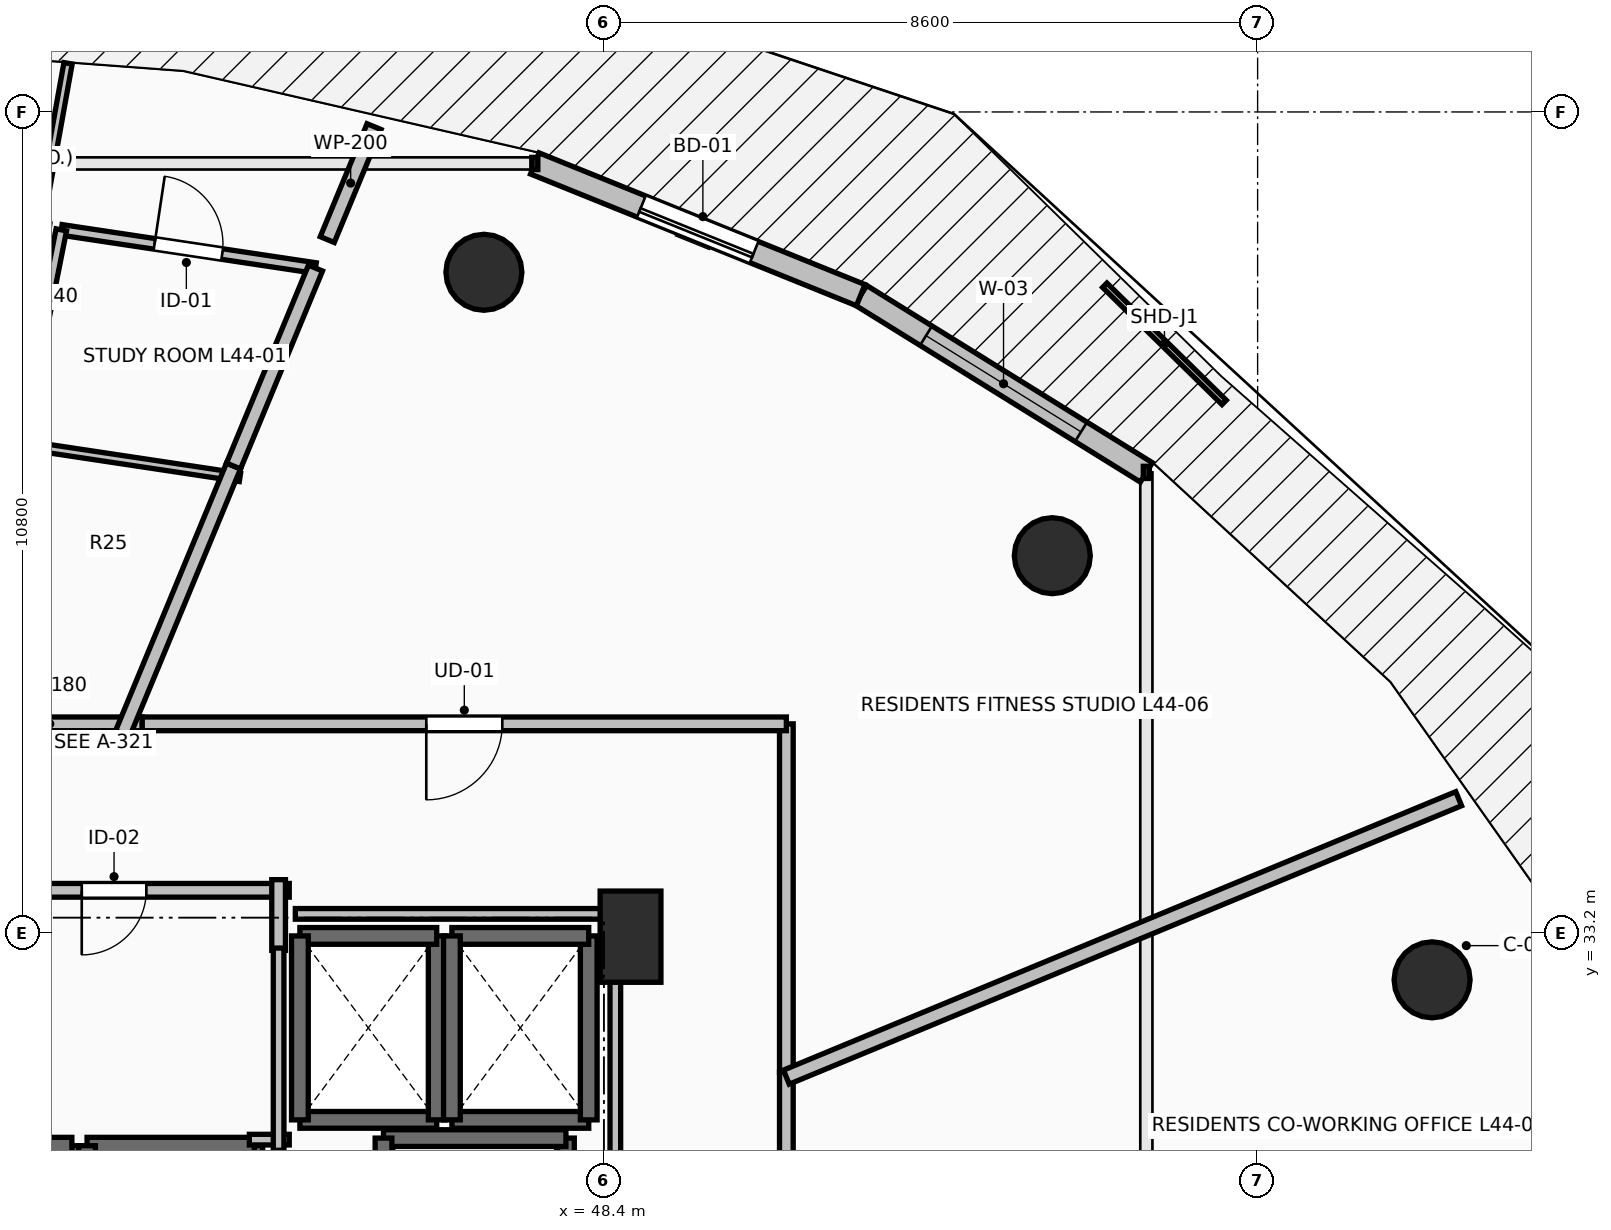
"""IFC4 building model, lengths in metres.
Left out: names, types, materials, properties, quantities, classifications, styles, units other than length and angle.
Written with IfcOpenShell. Run it as: python <this file> out.ifc"""

import sys

from ifc_helpers import new_model, si_unit, direction, frame, frame_2d, origin, origin_2d, place, context, subcontext, project, spatial, rectangle, circle, extrude, element, fill, save


model = new_model("IFC4")
c1 = context("Model", 3, precision=1e-05, world=origin(), true_north=direction((0.0, 1.0)))
c2 = subcontext(c1, "Body", "Model", "MODEL_VIEW")
j1 = project(units=[si_unit("LENGTHUNIT", "METRE"), si_unit("PLANEANGLEUNIT", "RADIAN")], contexts=[c1])
p1 = place(None, origin())
s1 = spatial("IfcSite", under=j1, at=p1, CompositionType="ELEMENT")
p2 = place(p1, origin())
s2 = spatial("IfcBuilding", under=s1, at=p2, CompositionType="ELEMENT")
p3 = place(p2, frame((0.0, 0.0, 164.1)))
s3 = spatial("IfcBuildingStorey", under=s2, at=p3, CompositionType="ELEMENT", Elevation=164.1)
for number, where, z_axis, x_axis in (
    (1, (59.295, 32.582, 0.0), (0.0, 0.0, 1.0), (0.924, 0.383, 0.0)),
    (2, (54.299, 38.162, 0.0), (0.0, 0.0, 1.0), (0.707, 0.707, 0.0)),
    (3, (46.821, 41.891, 0.0), (0.0, 0.0, 1.0), (0.383, 0.924, 0.0)),
):
    element("IfcColumn", number, at=place(p3, frame(where, z_axis=z_axis, x_axis=x_axis)), inside=s3, PredefinedType="COLUMN", context=c2, shape_type="SweptSolid", body=[
        extrude(circle(Radius=0.5, at=origin_2d()), origin(), (0.0, 0.0, 1.0), 3.5),
    ])
p4 = place(p3, frame((48.75, 33.15, 0.0), z_axis=(0.0, 0.0, 1.0), x_axis=(1.0, 0.0, 0.0)))
e4 = element("IfcColumn", 4, at=p4, inside=s3, PredefinedType="PILASTER", context=c2, shape_type="SweptSolid", body=[
    extrude(rectangle(XDim=0.8, YDim=1.2, at=origin_2d()), origin(), (0.0, 0.0, 1.0), 3.5),
])
p5 = place(p3, frame((55.536, 39.258, 0.0), z_axis=(0.0, 0.0, 1.0), x_axis=(-0.849721181976, 0.527232313977, 0.0)))
e5 = element("IfcWall", 5, at=p5, inside=s3, PredefinedType="STANDARD", context=c2, shape_type="SweptSolid", body=[
    extrude(rectangle(XDim=4.423, YDim=0.3, at=frame_2d((2.211, 0.0))), origin(), (0.0, 0.0, 1.0), 3.24),
])
p6 = place(p5, frame((1.011, 0.0, 0.85)))
e6 = element("IfcOpeningElement", 6, at=p6, cuts=e5, PredefinedType="OPENING", context=c2, shape_type="SweptSolid", body=[
    extrude(rectangle(XDim=2.4, YDim=2.19, at=frame_2d((1.2, 1.095))), frame((0.0, 0.165, 0.0), z_axis=(0.0, -1.0, 0.0), x_axis=(1.0, 0.0, 0.0)), (0.0, 0.0, 1.0), 0.33),
])
p7 = place(p3, frame((51.778, 41.59, 0.0), z_axis=(0.0, 0.0, 1.0), x_axis=(-0.927156504392, 0.374674280359, 0.0)))
e7 = element("IfcWall", 7, at=p7, inside=s3, PredefinedType="STANDARD", context=c2, shape_type="SweptSolid", body=[
    extrude(rectangle(XDim=4.625, YDim=0.3, at=frame_2d((2.312, 0.0))), origin(), (0.0, 0.0, 1.0), 3.24),
])
p8 = place(p7, frame((1.512, 0.0, 0.0)))
e8 = element("IfcOpeningElement", 8, at=p8, cuts=e7, PredefinedType="OPENING", context=c2, shape_type="SweptSolid", body=[
    extrude(rectangle(XDim=1.6, YDim=2.3, at=frame_2d((0.8, 1.15))), frame((0.0, 0.165, 0.0), z_axis=(0.0, -1.0, 0.0), x_axis=(1.0, 0.0, 0.0)), (0.0, 0.0, 1.0), 0.33),
])
p9 = place(p3, frame((41.4, 27.8, 0.0), z_axis=(0.0, 0.0, 1.0), x_axis=(0.0, 1.0, 0.0)))
e9 = element("IfcWall", 9, at=p9, inside=s3, PredefinedType="SOLIDWALL", context=c2, shape_type="SweptSolid", body=[
    extrude(rectangle(XDim=2.6, YDim=0.22, at=frame_2d((1.3, 0.0))), origin(), (0.0, 0.0, 1.0), 3.24),
])
p10 = place(p3, frame((41.4, 30.4, 0.0), z_axis=(0.0, 0.0, 1.0), x_axis=(-1.0, 0.0, 0.0)))
e10 = element("IfcWall", 10, at=p10, inside=s3, PredefinedType="SOLIDWALL", context=c2, shape_type="SweptSolid", body=[
    extrude(rectangle(XDim=2.2, YDim=0.22, at=frame_2d((1.1, 0.0))), origin(), (0.0, 0.0, 1.0), 3.24),
])
p11 = place(p3, frame((43.8, 27.8, 0.0), z_axis=(0.0, 0.0, 1.0), x_axis=(0.0, 1.0, 0.0)))
e11 = element("IfcWall", 11, at=p11, inside=s3, PredefinedType="SOLIDWALL", context=c2, shape_type="SweptSolid", body=[
    extrude(rectangle(XDim=2.6, YDim=0.22, at=frame_2d((1.3, 0.0))), origin(), (0.0, 0.0, 1.0), 3.24),
])
p12 = place(p3, frame((43.8, 30.4, 0.0), z_axis=(0.0, 0.0, 1.0), x_axis=(-1.0, 0.0, 0.0)))
e12 = element("IfcWall", 12, at=p12, inside=s3, PredefinedType="SOLIDWALL", context=c2, shape_type="SweptSolid", body=[
    extrude(rectangle(XDim=2.2, YDim=0.22, at=frame_2d((1.1, 0.0))), origin(), (0.0, 0.0, 1.0), 3.24),
])
p13 = place(p3, frame((41.6, 30.4, 0.0), z_axis=(0.0, 0.0, 1.0), x_axis=(0.0, -1.0, 0.0)))
e13 = element("IfcWall", 13, at=p13, inside=s3, PredefinedType="SOLIDWALL", context=c2, shape_type="SweptSolid", body=[
    extrude(rectangle(XDim=2.6, YDim=0.22, at=frame_2d((1.3, 0.0))), origin(), (0.0, 0.0, 1.0), 3.24),
])
p14 = place(p3, frame((44.4, 30.74, 0.0), z_axis=(0.0, 0.0, 1.0), x_axis=(1.0, 0.0, 0.0)))
e14 = element("IfcWall", 14, at=p14, inside=s3, PredefinedType="SOLIDWALL", context=c2, shape_type="SweptSolid", body=[
    extrude(rectangle(XDim=1.8, YDim=0.22, at=frame_2d((0.9, 0.0))), origin(), (0.0, 0.0, 1.0), 3.24),
])
p15 = place(p3, frame((46.2, 30.74, 0.0), z_axis=(0.0, 0.0, 1.0), x_axis=(0.0, 1.0, 0.0)))
e15 = element("IfcWall", 15, at=p15, inside=s3, PredefinedType="SOLIDWALL", context=c2, shape_type="SweptSolid", body=[
    extrude(rectangle(XDim=2.42, YDim=0.22, at=frame_2d((1.21, 0.0))), origin(), (0.0, 0.0, 1.0), 3.24),
])
p16 = place(p3, frame((46.2, 33.16, 0.0), z_axis=(0.0, 0.0, 1.0), x_axis=(-1.0, 0.0, 0.0)))
e16 = element("IfcWall", 16, at=p16, inside=s3, PredefinedType="SOLIDWALL", context=c2, shape_type="SweptSolid", body=[
    extrude(rectangle(XDim=1.8, YDim=0.22, at=frame_2d((0.9, 0.0))), origin(), (0.0, 0.0, 1.0), 3.24),
])
p17 = place(p3, frame((44.4, 33.16, 0.0), z_axis=(0.0, 0.0, 1.0), x_axis=(0.0, -1.0, 0.0)))
e17 = element("IfcWall", 17, at=p17, inside=s3, PredefinedType="SOLIDWALL", context=c2, shape_type="SweptSolid", body=[
    extrude(rectangle(XDim=2.42, YDim=0.22, at=frame_2d((1.21, 0.0))), origin(), (0.0, 0.0, 1.0), 3.24),
])
p18 = place(p3, frame((46.4, 30.74, 0.0), z_axis=(0.0, 0.0, 1.0), x_axis=(1.0, 0.0, 0.0)))
e18 = element("IfcWall", 18, at=p18, inside=s3, PredefinedType="SOLIDWALL", context=c2, shape_type="SweptSolid", body=[
    extrude(rectangle(XDim=1.8, YDim=0.22, at=frame_2d((0.9, 0.0))), origin(), (0.0, 0.0, 1.0), 3.24),
])
p19 = place(p3, frame((48.2, 30.74, 0.0), z_axis=(0.0, 0.0, 1.0), x_axis=(0.0, 1.0, 0.0)))
e19 = element("IfcWall", 19, at=p19, inside=s3, PredefinedType="SOLIDWALL", context=c2, shape_type="SweptSolid", body=[
    extrude(rectangle(XDim=2.42, YDim=0.22, at=frame_2d((1.21, 0.0))), origin(), (0.0, 0.0, 1.0), 3.24),
])
p20 = place(p3, frame((48.2, 33.16, 0.0), z_axis=(0.0, 0.0, 1.0), x_axis=(-1.0, 0.0, 0.0)))
e20 = element("IfcWall", 20, at=p20, inside=s3, PredefinedType="SOLIDWALL", context=c2, shape_type="SweptSolid", body=[
    extrude(rectangle(XDim=1.8, YDim=0.22, at=frame_2d((0.9, 0.0))), origin(), (0.0, 0.0, 1.0), 3.24),
])
p21 = place(p3, frame((46.4, 33.16, 0.0), z_axis=(0.0, 0.0, 1.0), x_axis=(0.0, -1.0, 0.0)))
e21 = element("IfcWall", 21, at=p21, inside=s3, PredefinedType="SOLIDWALL", context=c2, shape_type="SweptSolid", body=[
    extrude(rectangle(XDim=2.42, YDim=0.22, at=frame_2d((1.21, 0.0))), origin(), (0.0, 0.0, 1.0), 3.24),
])
p22 = place(p3, frame((47.9, 28.0, 0.0), z_axis=(0.0, 0.0, 1.0), x_axis=(0.0, 1.0, 0.0)))
e22 = element("IfcWall", 22, at=p22, inside=s3, PredefinedType="SHEAR", context=c2, shape_type="SweptSolid", body=[
    extrude(rectangle(XDim=2.5, YDim=0.22, at=frame_2d((1.25, 0.0))), origin(), (0.0, 0.0, 1.0), 3.24),
])
p23 = place(p3, frame((47.9, 30.5, 0.0), z_axis=(0.0, 0.0, 1.0), x_axis=(-1.0, 0.0, 0.0)))
e23 = element("IfcWall", 23, at=p23, inside=s3, PredefinedType="SHEAR", context=c2, shape_type="SweptSolid", body=[
    extrude(rectangle(XDim=2.4, YDim=0.22, at=frame_2d((1.2, 0.0))), origin(), (0.0, 0.0, 1.0), 3.24),
])
p24 = place(p3, frame((45.5, 30.5, 0.0), z_axis=(0.0, 0.0, 1.0), x_axis=(0.0, -1.0, 0.0)))
e24 = element("IfcWall", 24, at=p24, inside=s3, PredefinedType="SHEAR", context=c2, shape_type="SweptSolid", body=[
    extrude(rectangle(XDim=2.5, YDim=0.22, at=frame_2d((1.25, 0.0))), origin(), (0.0, 0.0, 1.0), 3.24),
])
p25 = place(p3, frame((44.26, 33.76, 0.0), z_axis=(0.0, 0.0, 1.0), x_axis=(-1.0, 0.0, 0.0)))
e25 = element("IfcWall", 25, at=p25, inside=s3, PredefinedType="PARTITIONING", context=c2, shape_type="SweptSolid", body=[
    extrude(rectangle(XDim=4.61, YDim=0.18, at=frame_2d((2.305, 0.0))), origin(), (0.0, 0.0, 1.0), 3.24),
])
p26 = place(p25, frame((1.88, 0.0, 0.0)))
e26 = element("IfcOpeningElement", 26, at=p26, cuts=e25, PredefinedType="OPENING", context=c2, shape_type="SweptSolid", body=[
    extrude(rectangle(XDim=0.85, YDim=2.1, at=frame_2d((0.425, 1.05))), frame((0.0, 0.105, 0.0), z_axis=(0.0, -1.0, 0.0), x_axis=(1.0, 0.0, 0.0)), (0.0, 0.0, 1.0), 0.21),
])
p27 = place(p3, frame((44.12, 32.97, 0.0), z_axis=(0.0, 0.0, 1.0), x_axis=(0.0, 1.0, 0.0)))
e27 = element("IfcWall", 27, at=p27, inside=s3, PredefinedType="PARTITIONING", context=c2, shape_type="SweptSolid", body=[
    extrude(rectangle(XDim=0.93, YDim=0.18, at=frame_2d((0.465, 0.0))), origin(), (0.0, 0.0, 1.0), 3.24),
])
p28 = place(p3, frame((42.326, 35.95, 0.0), z_axis=(0.0, 0.0, 1.0), x_axis=(-1.0, 0.0, 0.0)))
e28 = element("IfcWall", 28, at=p28, inside=s3, PredefinedType="PARTITIONING", context=c2, shape_type="SweptSolid", body=[
    extrude(rectangle(XDim=2.432, YDim=0.18, at=frame_2d((1.216, 0.0))), origin(), (0.0, 0.0, 1.0), 3.24),
])
p29 = place(p3, frame((50.8, 27.25, 0.0), z_axis=(0.0, 0.0, 1.0), x_axis=(0.0, 1.0, 0.0)))
e29 = element("IfcWall", 29, at=p29, inside=s3, PredefinedType="PARTITIONING", context=c2, shape_type="SweptSolid", body=[
    extrude(rectangle(XDim=4.117, YDim=0.18, at=frame_2d((2.059, 0.0))), origin(), (0.0, 0.0, 1.0), 2.432),
])
p30 = place(p3, frame((50.8, 31.367, 0.0), z_axis=(0.0, 0.0, 1.0), x_axis=(0.0, 1.0, 0.0)))
e30 = element("IfcWall", 30, at=p30, inside=s3, PredefinedType="PARTITIONING", context=c2, shape_type="SweptSolid", body=[
    extrude(rectangle(XDim=4.583, YDim=0.18, at=frame_2d((2.292, 0.0))), origin(), (0.0, 0.0, 1.0), 2.432),
])
p31 = place(p3, frame((50.8, 35.95, 0.0), z_axis=(0.0, 0.0, 1.0), x_axis=(-1.0, 0.0, 0.0)))
e31 = element("IfcWall", 31, at=p31, inside=s3, PredefinedType="PARTITIONING", context=c2, shape_type="SweptSolid", body=[
    extrude(rectangle(XDim=8.474, YDim=0.18, at=frame_2d((4.237, 0.0))), origin(), (0.0, 0.0, 1.0), 2.432),
])
p32 = place(p31, frame((3.737, 0.0, 0.0)))
e32 = element("IfcOpeningElement", 32, at=p32, cuts=e31, PredefinedType="OPENING", context=c2, shape_type="SweptSolid", body=[
    extrude(rectangle(XDim=1.0, YDim=2.15, at=frame_2d((0.5, 1.075))), frame((0.0, 0.105, 0.0), z_axis=(0.0, -1.0, 0.0), x_axis=(1.0, 0.0, 0.0)), (0.0, 0.0, 1.0), 0.21),
])
p33 = place(p3, frame((41.35, 44.64, 0.0), z_axis=(0.0, 0.0, 1.0), x_axis=(-0.176977699102, -0.984214861715, 0.0)))
e33 = element("IfcWall", 33, at=p33, inside=s3, PredefinedType="PARTITIONING", context=c2, shape_type="SweptSolid", body=[
    extrude(rectangle(XDim=2.32, YDim=0.11, at=frame_2d((1.16, 0.0))), origin(), (0.0, 0.0, 1.0), 2.728),
])
p34 = place(p3, frame((41.261, 42.449, 0.0), z_axis=(0.0, 0.0, 1.0), x_axis=(0.988878555922, -0.148725255545, 0.0)))
e34 = element("IfcWall", 34, at=p34, inside=s3, PredefinedType="PARTITIONING", context=c2, shape_type="SweptSolid", body=[
    extrude(rectangle(XDim=3.382, YDim=0.14, at=frame_2d((1.691, 0.0))), origin(), (0.0, 0.0, 1.0), 3.24),
])
p35 = place(p34, frame((1.241, 0.0, 0.0)))
e35 = element("IfcOpeningElement", 35, at=p35, cuts=e34, PredefinedType="OPENING", context=c2, shape_type="SweptSolid", body=[
    extrude(rectangle(XDim=0.9, YDim=2.1, at=frame_2d((0.45, 1.05))), frame((0.0, 0.085, 0.0), z_axis=(0.0, -1.0, 0.0), x_axis=(1.0, 0.0, 0.0)), (0.0, 0.0, 1.0), 0.17),
])
p36 = place(p3, frame((40.729, 39.767, 0.0), z_axis=(0.0, 0.0, 1.0), x_axis=(0.194501549107, 0.980902210924, 0.0)))
e36 = element("IfcWall", 36, at=p36, inside=s3, PredefinedType="PARTITIONING", context=c2, shape_type="SweptSolid", body=[
    extrude(rectangle(XDim=2.734, YDim=0.14, at=frame_2d((1.367, 0.0))), origin(), (0.0, 0.0, 1.0), 2.886),
])
p37 = place(p3, frame((44.76, 42.321, 0.0), z_axis=(0.0, 0.0, 1.0), x_axis=(0.382955001099, 0.923766998292, 0.0)))
e37 = element("IfcWall", 37, at=p37, inside=s3, PredefinedType="PARTITIONING", context=c2, shape_type="SweptSolid", body=[
    extrude(rectangle(XDim=1.608, YDim=0.2, at=frame_2d((0.804, 0.0))), origin(), (0.0, 0.0, 1.0), 2.728),
])
p38 = place(p3, frame((43.611, 39.192, 0.0), z_axis=(0.0, 0.0, 1.0), x_axis=(-0.988860105068, 0.148847884116, 0.0)))
e38 = element("IfcWall", 38, at=p38, inside=s3, PredefinedType="PARTITIONING", context=c2, shape_type="SweptSolid", body=[
    extrude(rectangle(XDim=3.082, YDim=0.11, at=frame_2d((1.541, 0.0))), origin(), (0.0, 0.0, 1.0), 2.886),
])
p39 = place(p3, frame((42.067, 35.821, 0.0), z_axis=(0.0, 0.0, 1.0), x_axis=(0.382813734438, 0.92382554886, 0.0)))
e39 = element("IfcWall", 39, at=p39, inside=s3, PredefinedType="PARTITIONING", context=c2, shape_type="SweptSolid", body=[
    extrude(rectangle(XDim=3.812, YDim=0.2, at=frame_2d((1.906, 0.0))), origin(), (0.0, 0.0, 1.0), 2.886),
])
p40 = place(p3, frame((43.527, 39.342, 0.0), z_axis=(0.0, 0.0, 1.0), x_axis=(0.38263998022, 0.923897529782, 0.0)))
e40 = element("IfcWall", 40, at=p40, inside=s3, PredefinedType="PARTITIONING", context=c2, shape_type="SweptSolid", body=[
    extrude(rectangle(XDim=2.818, YDim=0.2, at=frame_2d((1.409, 0.0))), origin(), (0.0, 0.0, 1.0), 2.886),
])
p41 = place(p3, frame((59.645, 34.965, 0.0), z_axis=(0.0, 0.0, 1.0), x_axis=(-0.923902460479, -0.382628074665, 0.0)))
e41 = element("IfcWall", 41, at=p41, inside=s3, PredefinedType="PARTITIONING", context=c2, shape_type="SweptSolid", body=[
    extrude(rectangle(XDim=9.573, YDim=0.2, at=frame_2d((4.787, 0.0))), origin(), (0.0, 0.0, 1.0), 2.432),
])
p42 = place(p3, frame((43.735, 30.48, 0.0), z_axis=(0.0, 0.0, 1.0), x_axis=(1.0, 0.0, 0.0)))
e42 = element("IfcWall", 42, at=p42, inside=s3, PredefinedType="PARTITIONING", context=c2, shape_type="SweptSolid", body=[
    extrude(rectangle(XDim=0.525, YDim=0.14, at=frame_2d((0.262, 0.0))), origin(), (0.0, 0.0, 1.0), 3.24),
])
p43 = place(p3, frame((44.12, 30.34, 0.0), z_axis=(0.0, 0.0, 1.0), x_axis=(0.0, 1.0, 0.0)))
e43 = element("IfcWall", 43, at=p43, inside=s3, PredefinedType="PARTITIONING", context=c2, shape_type="SweptSolid", body=[
    extrude(rectangle(XDim=2.66, YDim=0.14, at=frame_2d((1.33, 0.0))), origin(), (0.0, 0.0, 1.0), 3.24),
])
p44 = place(p3, frame((48.55, 28.196, 0.0), z_axis=(0.0, 0.0, 1.0), x_axis=(0.0, 1.0, 0.0)))
e44 = element("IfcWall", 44, at=p44, inside=s3, PredefinedType="PARTITIONING", context=c2, shape_type="SweptSolid", body=[
    extrude(rectangle(XDim=5.254, YDim=0.14, at=frame_2d((2.627, 0.0))), origin(), (0.0, 0.0, 1.0), 2.432),
])
p45 = place(p3, frame((48.55, 33.45, 0.0), z_axis=(0.0, 0.0, 1.0), x_axis=(-1.0, 0.0, 0.0)))
e45 = element("IfcWall", 45, at=p45, inside=s3, PredefinedType="PARTITIONING", context=c2, shape_type="SweptSolid", body=[
    extrude(rectangle(XDim=4.21, YDim=0.14, at=frame_2d((2.105, 0.0))), origin(), (0.0, 0.0, 1.0), 2.432),
])
p46 = place(p8, origin())
e46 = element("IfcDoor", 46, at=p46, inside=s3, OperationType="SLIDING_TO_LEFT", PredefinedType="DOOR", context=c2, shape_type="SweptSolid", body=[
    extrude(rectangle(XDim=1.6, YDim=2.3, at=frame_2d((0.8, 1.15))), frame((0.0, 0.025, 0.0), z_axis=(0.0, -1.0, 0.0), x_axis=(1.0, 0.0, 0.0)), (0.0, 0.0, 1.0), 0.05),
])
fill(e8, e46)
p47 = place(p6, origin())
e47 = element("IfcWindow", 47, at=p47, inside=s3, PartitioningType="SINGLE_PANEL", PredefinedType="WINDOW", context=c2, shape_type="SweptSolid", body=[
    extrude(rectangle(XDim=2.4, YDim=2.19, at=frame_2d((1.2, 1.095))), frame((0.0, 0.03, 0.0), z_axis=(0.0, -1.0, 0.0), x_axis=(1.0, 0.0, 0.0)), (0.0, 0.0, 1.0), 0.06),
])
fill(e6, e47)
p48 = place(p26, origin())
e48 = element("IfcDoor", 48, at=p48, inside=s3, OperationType="SINGLE_SWING_RIGHT", PredefinedType="DOOR", context=c2, shape_type="SweptSolid", body=[
    extrude(rectangle(XDim=0.85, YDim=2.1, at=frame_2d((0.425, 1.05))), frame((0.0, 0.025, 0.0), z_axis=(0.0, -1.0, 0.0), x_axis=(1.0, 0.0, 0.0)), (0.0, 0.0, 1.0), 0.05),
])
fill(e26, e48)
p49 = place(p32, origin())
e49 = element("IfcDoor", 49, at=p49, inside=s3, OperationType="SINGLE_SWING_RIGHT", PredefinedType="DOOR", context=c2, shape_type="SweptSolid", body=[
    extrude(rectangle(XDim=1.0, YDim=2.15, at=frame_2d((0.5, 1.075))), frame((0.0, 0.025, 0.0), z_axis=(0.0, -1.0, 0.0), x_axis=(1.0, 0.0, 0.0)), (0.0, 0.0, 1.0), 0.05),
])
fill(e32, e49)
p50 = place(p35, origin())
e50 = element("IfcDoor", 50, at=p50, inside=s3, OperationType="SINGLE_SWING_LEFT", PredefinedType="DOOR", context=c2, shape_type="SweptSolid", body=[
    extrude(rectangle(XDim=0.9, YDim=2.1, at=frame_2d((0.45, 1.05))), frame((0.0, 0.025, 0.0), z_axis=(0.0, -1.0, 0.0), x_axis=(1.0, 0.0, 0.0)), (0.0, 0.0, 1.0), 0.05),
])
fill(e35, e50)
save(model, sys.argv[1])
